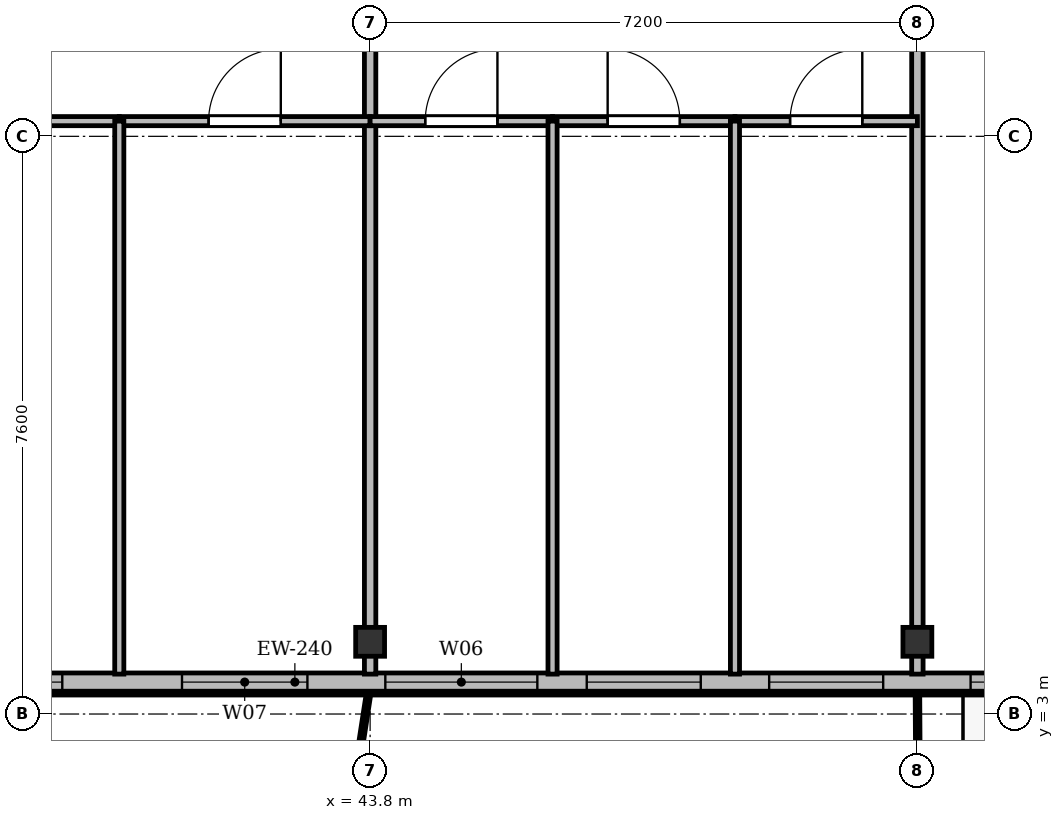
"""IFC4 building model, lengths in metres.
Left out: names, types, materials, properties, quantities, classifications, styles, units other than length and angle.
Written with IfcOpenShell. Run it as: python <this file> out.ifc"""

import sys

from ifc_helpers import new_model, si_unit, direction, frame, frame_2d, origin, origin_2d, place, context, subcontext, project, spatial, rectangle, i_section, extrude, source, transform, mapped, element, fill, save


model = new_model("IFC4")
c1 = context("Model", 3, precision=1e-05, world=origin(), true_north=direction((0.0, 1.0)))
c2 = subcontext(c1, "Body", "Model", "MODEL_VIEW")
j1 = project(units=[si_unit("LENGTHUNIT", "METRE"), si_unit("PLANEANGLEUNIT", "RADIAN")], contexts=[c1])
p1 = place(None, origin())
s1 = spatial("IfcSite", under=j1, at=p1, CompositionType="ELEMENT")
p2 = place(p1, origin())
s2 = spatial("IfcBuilding", under=s1, at=p2, CompositionType="ELEMENT")
p3 = place(p2, frame((0.0, 0.0, 139.3)))
s3 = spatial("IfcBuildingStorey", under=s2, at=p3, CompositionType="ELEMENT", Elevation=139.3)
m1 = source(origin(), c2, "Body", "SweptSolid", [
    extrude(i_section(OverallWidth=0.38, OverallDepth=0.38, WebThickness=0.02, FlangeThickness=0.03, at=origin_2d()), origin(), (0.0, 0.0, 1.0), 3.6),
])
for number, where, z_axis, x_axis in (
    (1, (43.8, 3.95, 0.0), (0.0, 0.0, 1.0), (1.0, 0.0, 0.0)),
    (2, (51.0, 3.95, 0.0), (0.0, 0.0, 1.0), (1.0, 0.0, 0.0)),
):
    element("IfcColumn", number, at=place(p3, frame(where, z_axis=z_axis, x_axis=x_axis)), inside=s3, PredefinedType="COLUMN", context=c2, shape_type="MappedRepresentation", body=[
        mapped(m1, transform((0.0, 0.0, 0.0), x_axis=(1.0, 0.0, 0.0), y_axis=(0.0, 1.0, 0.0), z_axis=(0.0, 0.0, 1.0), scale=1.0)),
    ])
p4 = place(p3, frame((63.6, 3.42, 0.0), z_axis=(0.0, 0.0, 1.0), x_axis=(-1.0, 0.0, 0.0)))
e3 = element("IfcWall", 3, at=p4, inside=s3, PredefinedType="SOLIDWALL", context=c2, shape_type="SweptSolid", body=[
    extrude(rectangle(XDim=52.8, YDim=0.24, at=frame_2d((26.4, 0.0))), origin(), (0.0, 0.0, 1.0), 3.35),
])
p5 = place(p4, frame((0.495, 0.0, 0.9)))
e4 = element("IfcOpeningElement", 4, at=p5, cuts=e3, PredefinedType="OPENING", context=c2, shape_type="SweptSolid", body=[
    extrude(rectangle(XDim=1.5, YDim=1.75, at=frame_2d((0.75, 0.875))), frame((0.0, 0.13, 0.0), z_axis=(0.0, -1.0, 0.0), x_axis=(1.0, 0.0, 0.0)), (0.0, 0.0, 1.0), 0.26),
])
p6 = place(p4, frame((2.9, 0.0, 0.9)))
e5 = element("IfcOpeningElement", 5, at=p6, cuts=e3, PredefinedType="OPENING", context=c2, shape_type="SweptSolid", body=[
    extrude(rectangle(XDim=1.5, YDim=1.75, at=frame_2d((0.75, 0.875))), frame((0.0, 0.13, 0.0), z_axis=(0.0, -1.0, 0.0), x_axis=(1.0, 0.0, 0.0)), (0.0, 0.0, 1.0), 0.26),
])
p7 = place(p4, frame((5.902, 0.0, 0.0)))
e6 = element("IfcOpeningElement", 6, at=p7, cuts=e3, PredefinedType="OPENING", context=c2, shape_type="SweptSolid", body=[
    extrude(rectangle(XDim=1.2, YDim=2.2, at=frame_2d((0.6, 1.1))), frame((0.0, 0.13, 0.0), z_axis=(0.0, -1.0, 0.0), x_axis=(1.0, 0.0, 0.0)), (0.0, 0.0, 1.0), 0.26),
])
p8 = place(p4, frame((7.65, 0.0, 0.9)))
e7 = element("IfcOpeningElement", 7, at=p8, cuts=e3, PredefinedType="OPENING", context=c2, shape_type="SweptSolid", body=[
    extrude(rectangle(XDim=1.5, YDim=1.75, at=frame_2d((0.75, 0.875))), frame((0.0, 0.13, 0.0), z_axis=(0.0, -1.0, 0.0), x_axis=(1.0, 0.0, 0.0)), (0.0, 0.0, 1.0), 0.26),
])
p9 = place(p4, frame((10.1, 0.0, 0.9)))
e8 = element("IfcOpeningElement", 8, at=p9, cuts=e3, PredefinedType="OPENING", context=c2, shape_type="SweptSolid", body=[
    extrude(rectangle(XDim=1.8, YDim=1.8, at=frame_2d((0.9, 0.9))), frame((0.0, 0.13, 0.0), z_axis=(0.0, -1.0, 0.0), x_axis=(1.0, 0.0, 0.0)), (0.0, 0.0, 1.0), 0.26),
])
p10 = place(p4, frame((13.05, 0.0, 0.9)))
e9 = element("IfcOpeningElement", 9, at=p10, cuts=e3, PredefinedType="OPENING", context=c2, shape_type="SweptSolid", body=[
    extrude(rectangle(XDim=1.5, YDim=1.75, at=frame_2d((0.75, 0.875))), frame((0.0, 0.13, 0.0), z_axis=(0.0, -1.0, 0.0), x_axis=(1.0, 0.0, 0.0)), (0.0, 0.0, 1.0), 0.26),
])
p11 = place(p4, frame((15.45, 0.0, 0.9)))
e10 = element("IfcOpeningElement", 10, at=p11, cuts=e3, PredefinedType="OPENING", context=c2, shape_type="SweptSolid", body=[
    extrude(rectangle(XDim=1.5, YDim=1.75, at=frame_2d((0.75, 0.875))), frame((0.0, 0.13, 0.0), z_axis=(0.0, -1.0, 0.0), x_axis=(1.0, 0.0, 0.0)), (0.0, 0.0, 1.0), 0.26),
])
p12 = place(p4, frame((17.6, 0.0, 0.9)))
e11 = element("IfcOpeningElement", 11, at=p12, cuts=e3, PredefinedType="OPENING", context=c2, shape_type="SweptSolid", body=[
    extrude(rectangle(XDim=2.0, YDim=1.95, at=frame_2d((1.0, 0.975))), frame((0.0, 0.13, 0.0), z_axis=(0.0, -1.0, 0.0), x_axis=(1.0, 0.0, 0.0)), (0.0, 0.0, 1.0), 0.26),
])
p13 = place(p4, frame((20.625, 0.0, 0.9)))
e12 = element("IfcOpeningElement", 12, at=p13, cuts=e3, PredefinedType="OPENING", context=c2, shape_type="SweptSolid", body=[
    extrude(rectangle(XDim=1.65, YDim=1.85, at=frame_2d((0.825, 0.925))), frame((0.0, 0.13, 0.0), z_axis=(0.0, -1.0, 0.0), x_axis=(1.0, 0.0, 0.0)), (0.0, 0.0, 1.0), 0.26),
])
p14 = place(p4, frame((23.85, 0.0, 0.9)))
e13 = element("IfcOpeningElement", 13, at=p14, cuts=e3, PredefinedType="OPENING", context=c2, shape_type="SweptSolid", body=[
    extrude(rectangle(XDim=1.8, YDim=1.8, at=frame_2d((0.9, 0.9))), frame((0.0, 0.13, 0.0), z_axis=(0.0, -1.0, 0.0), x_axis=(1.0, 0.0, 0.0)), (0.0, 0.0, 1.0), 0.26),
])
p15 = place(p4, frame((28.6, 0.0, 0.9)))
e14 = element("IfcOpeningElement", 14, at=p15, cuts=e3, PredefinedType="OPENING", context=c2, shape_type="SweptSolid", body=[
    extrude(rectangle(XDim=2.2, YDim=1.8, at=frame_2d((1.1, 0.9))), frame((0.0, 0.13, 0.0), z_axis=(0.0, -1.0, 0.0), x_axis=(1.0, 0.0, 0.0)), (0.0, 0.0, 1.0), 0.26),
])
p16 = place(p4, frame((34.478, 0.0, 0.0)))
e15 = element("IfcOpeningElement", 15, at=p16, cuts=e3, PredefinedType="OPENING", context=c2, shape_type="SweptSolid", body=[
    extrude(rectangle(XDim=1.2, YDim=2.2, at=frame_2d((0.6, 1.1))), frame((0.0, 0.13, 0.0), z_axis=(0.0, -1.0, 0.0), x_axis=(1.0, 0.0, 0.0)), (0.0, 0.0, 1.0), 0.26),
])
p17 = place(p4, frame((37.4, 0.0, 0.9)))
e16 = element("IfcOpeningElement", 16, at=p17, cuts=e3, PredefinedType="OPENING", context=c2, shape_type="SweptSolid", body=[
    extrude(rectangle(XDim=2.0, YDim=1.95, at=frame_2d((1.0, 0.975))), frame((0.0, 0.13, 0.0), z_axis=(0.0, -1.0, 0.0), x_axis=(1.0, 0.0, 0.0)), (0.0, 0.0, 1.0), 0.26),
])
p18 = place(p4, frame((40.975, 0.0, 0.9)))
e17 = element("IfcOpeningElement", 17, at=p18, cuts=e3, PredefinedType="OPENING", context=c2, shape_type="SweptSolid", body=[
    extrude(rectangle(XDim=1.65, YDim=1.85, at=frame_2d((0.825, 0.925))), frame((0.0, 0.13, 0.0), z_axis=(0.0, -1.0, 0.0), x_axis=(1.0, 0.0, 0.0)), (0.0, 0.0, 1.0), 0.26),
])
p19 = place(p4, frame((43.65, 0.0, 0.9)))
e18 = element("IfcOpeningElement", 18, at=p19, cuts=e3, PredefinedType="OPENING", context=c2, shape_type="SweptSolid", body=[
    extrude(rectangle(XDim=1.5, YDim=1.75, at=frame_2d((0.75, 0.875))), frame((0.0, 0.13, 0.0), z_axis=(0.0, -1.0, 0.0), x_axis=(1.0, 0.0, 0.0)), (0.0, 0.0, 1.0), 0.26),
])
p20 = place(p4, frame((45.85, 0.0, 0.9)))
e19 = element("IfcOpeningElement", 19, at=p20, cuts=e3, PredefinedType="OPENING", context=c2, shape_type="SweptSolid", body=[
    extrude(rectangle(XDim=1.5, YDim=1.75, at=frame_2d((0.75, 0.875))), frame((0.0, 0.13, 0.0), z_axis=(0.0, -1.0, 0.0), x_axis=(1.0, 0.0, 0.0)), (0.0, 0.0, 1.0), 0.26),
])
p21 = place(p4, frame((48.25, 0.0, 0.9)))
e20 = element("IfcOpeningElement", 20, at=p21, cuts=e3, PredefinedType="OPENING", context=c2, shape_type="SweptSolid", body=[
    extrude(rectangle(XDim=1.5, YDim=1.75, at=frame_2d((0.75, 0.875))), frame((0.0, 0.13, 0.0), z_axis=(0.0, -1.0, 0.0), x_axis=(1.0, 0.0, 0.0)), (0.0, 0.0, 1.0), 0.26),
])
p22 = place(p4, frame((50.455, 0.0, 0.9)))
e21 = element("IfcOpeningElement", 21, at=p22, cuts=e3, PredefinedType="OPENING", context=c2, shape_type="SweptSolid", body=[
    extrude(rectangle(XDim=2.0, YDim=1.95, at=frame_2d((1.0, 0.975))), frame((0.0, 0.13, 0.0), z_axis=(0.0, -1.0, 0.0), x_axis=(1.0, 0.0, 0.0)), (0.0, 0.0, 1.0), 0.26),
])
for number, where, z_axis, x_axis in (
    (22, (43.8, 3.525, 0.0), (0.0, 0.0, 1.0), (0.0, 1.0, 0.0)),
    (23, (51.0, 3.525, 0.0), (0.0, 0.0, 1.0), (0.0, 1.0, 0.0)),
):
    element("IfcWall", number, at=place(p3, frame(where, z_axis=z_axis, x_axis=x_axis)), inside=s3, PredefinedType="PARTITIONING", context=c2, shape_type="SweptSolid", body=[
        extrude(rectangle(XDim=27.275, YDim=0.15, at=frame_2d((13.638, 0.0))), origin(), (0.0, 0.0, 1.0), 2.85),
    ])
p23 = place(p3, frame((37.2, 10.8, 0.0), z_axis=(0.0, 0.0, 1.0), x_axis=(1.0, 0.0, 0.0)))
e24 = element("IfcWall", 24, at=p23, inside=s3, PredefinedType="PARTITIONING", context=c2, shape_type="SweptSolid", body=[
    extrude(rectangle(XDim=3.3, YDim=0.12, at=frame_2d((1.65, 0.0))), origin(), (0.0, 0.0, 1.0), 3.0),
])
p24 = place(p23, frame((1.175, 0.0, 0.0)))
e25 = element("IfcOpeningElement", 25, at=p24, cuts=e24, PredefinedType="OPENING", context=c2, shape_type="SweptSolid", body=[
    extrude(rectangle(XDim=0.95, YDim=2.15, at=frame_2d((0.475, 1.075))), frame((0.0, 0.07, 0.0), z_axis=(0.0, -1.0, 0.0), x_axis=(1.0, 0.0, 0.0)), (0.0, 0.0, 1.0), 0.14),
])
p25 = place(p3, frame((40.5, 10.8, 0.0), z_axis=(0.0, 0.0, 1.0), x_axis=(1.0, 0.0, 0.0)))
e26 = element("IfcWall", 26, at=p25, inside=s3, PredefinedType="PARTITIONING", context=c2, shape_type="SweptSolid", body=[
    extrude(rectangle(XDim=3.3, YDim=0.12, at=frame_2d((1.65, 0.0))), origin(), (0.0, 0.0, 1.0), 2.85),
])
p26 = place(p25, frame((1.175, 0.0, 0.0)))
e27 = element("IfcOpeningElement", 27, at=p26, cuts=e26, PredefinedType="OPENING", context=c2, shape_type="SweptSolid", body=[
    extrude(rectangle(XDim=0.95, YDim=2.15, at=frame_2d((0.475, 1.075))), frame((0.0, 0.07, 0.0), z_axis=(0.0, -1.0, 0.0), x_axis=(1.0, 0.0, 0.0)), (0.0, 0.0, 1.0), 0.14),
])
p27 = place(p3, frame((40.5, 3.525, 0.0), z_axis=(0.0, 0.0, 1.0), x_axis=(0.0, 1.0, 0.0)))
e28 = element("IfcWall", 28, at=p27, inside=s3, PredefinedType="PARTITIONING", context=c2, shape_type="SweptSolid", body=[
    extrude(rectangle(XDim=7.275, YDim=0.12, at=frame_2d((3.638, 0.0))), origin(), (0.0, 0.0, 1.0), 2.75),
])
p28 = place(p3, frame((43.8, 10.8, 0.0), z_axis=(0.0, 0.0, 1.0), x_axis=(1.0, 0.0, 0.0)))
e29 = element("IfcWall", 29, at=p28, inside=s3, PredefinedType="PARTITIONING", context=c2, shape_type="SweptSolid", body=[
    extrude(rectangle(XDim=2.4, YDim=0.12, at=frame_2d((1.2, 0.0))), origin(), (0.0, 0.0, 1.0), 2.85),
])
p29 = place(p28, frame((0.725, 0.0, 0.0)))
e30 = element("IfcOpeningElement", 30, at=p29, cuts=e29, PredefinedType="OPENING", context=c2, shape_type="SweptSolid", body=[
    extrude(rectangle(XDim=0.95, YDim=2.15, at=frame_2d((0.475, 1.075))), frame((0.0, 0.07, 0.0), z_axis=(0.0, -1.0, 0.0), x_axis=(1.0, 0.0, 0.0)), (0.0, 0.0, 1.0), 0.14),
])
p30 = place(p3, frame((46.2, 10.8, 0.0), z_axis=(0.0, 0.0, 1.0), x_axis=(1.0, 0.0, 0.0)))
e31 = element("IfcWall", 31, at=p30, inside=s3, PredefinedType="PARTITIONING", context=c2, shape_type="SweptSolid", body=[
    extrude(rectangle(XDim=2.4, YDim=0.12, at=frame_2d((1.2, 0.0))), origin(), (0.0, 0.0, 1.0), 3.0),
])
p31 = place(p30, frame((0.725, 0.0, 0.0)))
e32 = element("IfcOpeningElement", 32, at=p31, cuts=e31, PredefinedType="OPENING", context=c2, shape_type="SweptSolid", body=[
    extrude(rectangle(XDim=0.95, YDim=2.15, at=frame_2d((0.475, 1.075))), frame((0.0, 0.07, 0.0), z_axis=(0.0, -1.0, 0.0), x_axis=(1.0, 0.0, 0.0)), (0.0, 0.0, 1.0), 0.14),
])
p32 = place(p3, frame((46.2, 3.525, 0.0), z_axis=(0.0, 0.0, 1.0), x_axis=(0.0, 1.0, 0.0)))
e33 = element("IfcWall", 33, at=p32, inside=s3, PredefinedType="PARTITIONING", context=c2, shape_type="SweptSolid", body=[
    extrude(rectangle(XDim=7.275, YDim=0.12, at=frame_2d((3.638, 0.0))), origin(), (0.0, 0.0, 1.0), 2.75),
])
p33 = place(p3, frame((48.6, 10.8, 0.0), z_axis=(0.0, 0.0, 1.0), x_axis=(1.0, 0.0, 0.0)))
e34 = element("IfcWall", 34, at=p33, inside=s3, PredefinedType="PARTITIONING", context=c2, shape_type="SweptSolid", body=[
    extrude(rectangle(XDim=2.4, YDim=0.12, at=frame_2d((1.2, 0.0))), origin(), (0.0, 0.0, 1.0), 2.85),
])
p34 = place(p33, frame((0.725, 0.0, 0.0)))
e35 = element("IfcOpeningElement", 35, at=p34, cuts=e34, PredefinedType="OPENING", context=c2, shape_type="SweptSolid", body=[
    extrude(rectangle(XDim=0.95, YDim=2.15, at=frame_2d((0.475, 1.075))), frame((0.0, 0.07, 0.0), z_axis=(0.0, -1.0, 0.0), x_axis=(1.0, 0.0, 0.0)), (0.0, 0.0, 1.0), 0.14),
])
p35 = place(p3, frame((48.6, 3.525, 0.0), z_axis=(0.0, 0.0, 1.0), x_axis=(0.0, 1.0, 0.0)))
e36 = element("IfcWall", 36, at=p35, inside=s3, PredefinedType="PARTITIONING", context=c2, shape_type="SweptSolid", body=[
    extrude(rectangle(XDim=7.275, YDim=0.12, at=frame_2d((3.638, 0.0))), origin(), (0.0, 0.0, 1.0), 2.75),
])
m2 = source(origin(), c2, "Body", "SweptSolid", [
    extrude(rectangle(XDim=1.8, YDim=1.8, at=frame_2d((0.9, 0.9))), frame((0.0, 0.03, 0.0), z_axis=(0.0, -1.0, 0.0), x_axis=(1.0, 0.0, 0.0)), (0.0, 0.0, 1.0), 0.06),
])
p36 = place(p9, origin())
e37 = element("IfcWindow", 37, at=p36, inside=s3, PartitioningType="SINGLE_PANEL", PredefinedType="WINDOW", context=c2, shape_type="MappedRepresentation", body=[
    mapped(m2, transform((0.0, 0.0, 0.0), x_axis=(1.0, 0.0, 0.0), y_axis=(0.0, 1.0, 0.0), z_axis=(0.0, 0.0, 1.0), scale=1.0)),
])
fill(e8, e37)
m3 = source(origin(), c2, "Body", "SweptSolid", [
    extrude(rectangle(XDim=1.5, YDim=1.75, at=frame_2d((0.75, 0.875))), frame((0.0, 0.03, 0.0), z_axis=(0.0, -1.0, 0.0), x_axis=(1.0, 0.0, 0.0)), (0.0, 0.0, 1.0), 0.06),
])
p37 = place(p10, origin())
e38 = element("IfcWindow", 38, at=p37, inside=s3, PartitioningType="SINGLE_PANEL", PredefinedType="WINDOW", context=c2, shape_type="MappedRepresentation", body=[
    mapped(m3, transform((0.0, 0.0, 0.0), x_axis=(1.0, 0.0, 0.0), y_axis=(0.0, 1.0, 0.0), z_axis=(0.0, 0.0, 1.0), scale=1.0)),
])
fill(e9, e38)
p38 = place(p11, origin())
e39 = element("IfcWindow", 39, at=p38, inside=s3, PartitioningType="SINGLE_PANEL", PredefinedType="WINDOW", context=c2, shape_type="MappedRepresentation", body=[
    mapped(m3, transform((0.0, 0.0, 0.0), x_axis=(1.0, 0.0, 0.0), y_axis=(0.0, 1.0, 0.0), z_axis=(0.0, 0.0, 1.0), scale=1.0)),
])
fill(e10, e39)
m4 = source(origin(), c2, "Body", "SweptSolid", [
    extrude(rectangle(XDim=2.0, YDim=1.95, at=frame_2d((1.0, 0.975))), frame((0.0, 0.03, 0.0), z_axis=(0.0, -1.0, 0.0), x_axis=(1.0, 0.0, 0.0)), (0.0, 0.0, 1.0), 0.06),
])
p39 = place(p12, origin())
e40 = element("IfcWindow", 40, at=p39, inside=s3, PartitioningType="SINGLE_PANEL", PredefinedType="WINDOW", context=c2, shape_type="MappedRepresentation", body=[
    mapped(m4, transform((0.0, 0.0, 0.0), x_axis=(1.0, 0.0, 0.0), y_axis=(0.0, 1.0, 0.0), z_axis=(0.0, 0.0, 1.0), scale=1.0)),
])
fill(e11, e40)
m5 = source(origin(), c2, "Body", "SweptSolid", [
    extrude(rectangle(XDim=1.65, YDim=1.85, at=frame_2d((0.825, 0.925))), frame((0.0, 0.03, 0.0), z_axis=(0.0, -1.0, 0.0), x_axis=(1.0, 0.0, 0.0)), (0.0, 0.0, 1.0), 0.06),
])
p40 = place(p13, origin())
e41 = element("IfcWindow", 41, at=p40, inside=s3, PartitioningType="SINGLE_PANEL", PredefinedType="WINDOW", context=c2, shape_type="MappedRepresentation", body=[
    mapped(m5, transform((0.0, 0.0, 0.0), x_axis=(1.0, 0.0, 0.0), y_axis=(0.0, 1.0, 0.0), z_axis=(0.0, 0.0, 1.0), scale=1.0)),
])
fill(e12, e41)
p41 = place(p14, origin())
e42 = element("IfcWindow", 42, at=p41, inside=s3, PartitioningType="SINGLE_PANEL", PredefinedType="WINDOW", context=c2, shape_type="MappedRepresentation", body=[
    mapped(m2, transform((0.0, 0.0, 0.0), x_axis=(1.0, 0.0, 0.0), y_axis=(0.0, 1.0, 0.0), z_axis=(0.0, 0.0, 1.0), scale=1.0)),
])
fill(e13, e42)
m6 = source(origin(), c2, "Body", "SweptSolid", [
    extrude(rectangle(XDim=0.95, YDim=2.15, at=frame_2d((0.475, 1.075))), frame((0.0, 0.025, 0.0), z_axis=(0.0, -1.0, 0.0), x_axis=(1.0, 0.0, 0.0)), (0.0, 0.0, 1.0), 0.05),
])
p42 = place(p26, origin())
e43 = element("IfcDoor", 43, at=p42, inside=s3, OperationType="SINGLE_SWING_RIGHT", PredefinedType="DOOR", context=c2, shape_type="MappedRepresentation", body=[
    mapped(m6, transform((0.0, 0.0, 0.0), x_axis=(1.0, 0.0, 0.0), y_axis=(0.0, 1.0, 0.0), z_axis=(0.0, 0.0, 1.0), scale=1.0)),
])
fill(e27, e43)
p43 = place(p29, origin())
e44 = element("IfcDoor", 44, at=p43, inside=s3, OperationType="SINGLE_SWING_RIGHT", PredefinedType="DOOR", context=c2, shape_type="MappedRepresentation", body=[
    mapped(m6, transform((0.0, 0.0, 0.0), x_axis=(1.0, 0.0, 0.0), y_axis=(0.0, 1.0, 0.0), z_axis=(0.0, 0.0, 1.0), scale=1.0)),
])
fill(e30, e44)
p44 = place(p31, origin())
e45 = element("IfcDoor", 45, at=p44, inside=s3, OperationType="SINGLE_SWING_LEFT", PredefinedType="DOOR", context=c2, shape_type="MappedRepresentation", body=[
    mapped(m6, transform((0.0, 0.0, 0.0), x_axis=(1.0, 0.0, 0.0), y_axis=(0.0, 1.0, 0.0), z_axis=(0.0, 0.0, 1.0), scale=1.0)),
])
fill(e32, e45)
p45 = place(p34, origin())
e46 = element("IfcDoor", 46, at=p45, inside=s3, OperationType="SINGLE_SWING_RIGHT", PredefinedType="DOOR", context=c2, shape_type="MappedRepresentation", body=[
    mapped(m6, transform((0.0, 0.0, 0.0), x_axis=(1.0, 0.0, 0.0), y_axis=(0.0, 1.0, 0.0), z_axis=(0.0, 0.0, 1.0), scale=1.0)),
])
fill(e35, e46)
save(model, sys.argv[1])
